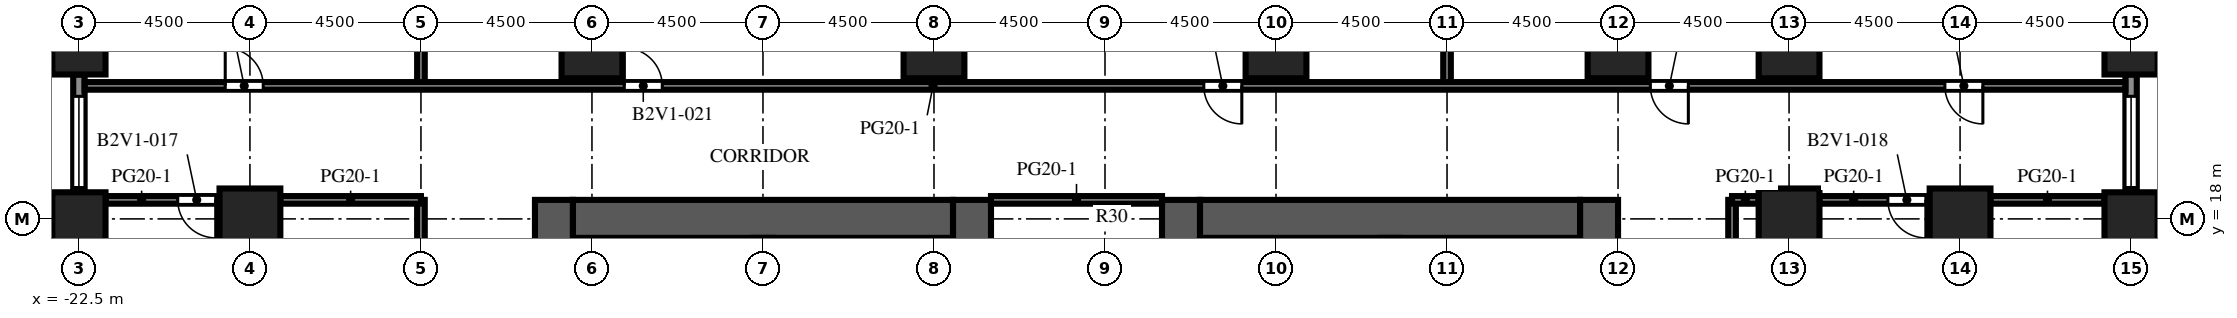
"""IFC4 building model, lengths in metres.
Left out: names, types, materials, properties, quantities, classifications, styles, units other than length and angle.
Written with IfcOpenShell. Run it as: python <this file> out.ifc"""

import sys

from ifc_helpers import new_model, si_unit, direction, frame, frame_2d, origin, origin_2d, place, context, subcontext, project, spatial, rectangle, extrude, element, fill, save


model = new_model("IFC4")
c1 = context("Model", 3, precision=1e-05, world=origin(), true_north=direction((0.0, 1.0)))
c2 = subcontext(c1, "Body", "Model", "MODEL_VIEW")
j1 = project(units=[si_unit("LENGTHUNIT", "METRE"), si_unit("PLANEANGLEUNIT", "RADIAN")], contexts=[c1])
p1 = place(None, origin())
s1 = spatial("IfcSite", under=j1, at=p1, CompositionType="ELEMENT")
p2 = place(p1, origin())
s2 = spatial("IfcBuilding", under=s1, at=p2, CompositionType="ELEMENT")
p3 = place(p2, frame((0.0, 0.0, 46.0)))
s3 = spatial("IfcBuildingStorey", under=s2, at=p3, CompositionType="ELEMENT", Elevation=46.0)
for number, where, z_axis, x_axis in (
    (1, (-22.5, 18.0, 0.0), (0.0, 0.0, 1.0), (1.0, 0.0, 0.0)),
    (2, (-22.5, 22.5, 0.0), (0.0, 0.0, 1.0), (1.0, 0.0, 0.0)),
    (3, (31.5, 18.0, 0.0), (0.0, 0.0, 1.0), (1.0, 0.0, 0.0)),
    (4, (31.5, 22.5, 0.0), (0.0, 0.0, 1.0), (1.0, 0.0, 0.0)),
):
    element("IfcColumn", number, at=place(p3, frame(where, z_axis=z_axis, x_axis=x_axis)), inside=s3, PredefinedType="COLUMN", context=c2, shape_type="SweptSolid", body=[
        extrude(rectangle(XDim=1.4, YDim=1.4, at=origin_2d()), origin(), (0.0, 0.0, 1.0), 4.1),
    ])
for number, where, z_axis, x_axis in (
    (5, (-18.0, 18.0, 0.0), (0.0, 0.0, 1.0), (1.0, 0.0, 0.0)),
    (6, (-9.0, 22.5, 0.0), (0.0, 0.0, 1.0), (1.0, 0.0, 0.0)),
    (7, (0.0, 22.5, 0.0), (0.0, 0.0, 1.0), (1.0, 0.0, 0.0)),
    (8, (9.0, 22.5, 0.0), (0.0, 0.0, 1.0), (1.0, 0.0, 0.0)),
    (9, (18.0, 22.5, 0.0), (0.0, 0.0, 1.0), (1.0, 0.0, 0.0)),
    (10, (22.5, 18.0, 0.0), (0.0, 0.0, 1.0), (1.0, 0.0, 0.0)),
    (11, (22.5, 22.5, 0.0), (0.0, 0.0, 1.0), (1.0, 0.0, 0.0)),
    (12, (27.0, 18.0, 0.0), (0.0, 0.0, 1.0), (1.0, 0.0, 0.0)),
):
    element("IfcColumn", number, at=place(p3, frame(where, z_axis=z_axis, x_axis=x_axis)), inside=s3, PredefinedType="COLUMN", context=c2, shape_type="SweptSolid", body=[
        extrude(rectangle(XDim=1.6, YDim=1.6, at=origin_2d()), origin(), (0.0, 0.0, 1.0), 4.1),
    ])
p4 = place(p3, frame((-10.0, -9.0, 0.0), z_axis=(0.0, 0.0, 1.0), x_axis=(0.0, 1.0, 0.0)))
e13 = element("IfcWall", 13, at=p4, inside=s3, PredefinedType="SHEAR", context=c2, shape_type="SweptSolid", body=[
    extrude(rectangle(XDim=27.5, YDim=1.0, at=frame_2d((13.75, 0.0))), origin(), (0.0, 0.0, 1.0), 4.1),
])
p5 = place(p4, frame((12.55, 0.0, 0.0)))
e14 = element("IfcOpeningElement", 14, at=p5, cuts=e13, PredefinedType="OPENING", context=c2, shape_type="SweptSolid", body=[
    extrude(rectangle(XDim=2.4, YDim=2.4, at=frame_2d((1.2, 1.2))), frame((0.0, 0.51, 0.0), z_axis=(0.0, -1.0, 0.0), x_axis=(1.0, 0.0, 0.0)), (0.0, 0.0, 1.0), 1.02),
])
p6 = place(p4, frame((6.825, 0.0, 0.0)))
e15 = element("IfcOpeningElement", 15, at=p6, cuts=e13, PredefinedType="OPENING", context=c2, shape_type="SweptSolid", body=[
    extrude(rectangle(XDim=1.2, YDim=2.1, at=frame_2d((0.6, 1.05))), frame((0.0, 0.51, 0.0), z_axis=(0.0, -1.0, 0.0), x_axis=(1.0, 0.0, 0.0)), (0.0, 0.0, 1.0), 1.02),
])
p7 = place(p4, frame((19.475, 0.0, 0.0)))
e16 = element("IfcOpeningElement", 16, at=p7, cuts=e13, PredefinedType="OPENING", context=c2, shape_type="SweptSolid", body=[
    extrude(rectangle(XDim=1.2, YDim=2.1, at=frame_2d((0.6, 1.05))), frame((0.0, 0.51, 0.0), z_axis=(0.0, -1.0, 0.0), x_axis=(1.0, 0.0, 0.0)), (0.0, 0.0, 1.0), 1.02),
])
p8 = place(p3, frame((1.0, -9.0, 0.0), z_axis=(0.0, 0.0, 1.0), x_axis=(0.0, 1.0, 0.0)))
e17 = element("IfcWall", 17, at=p8, inside=s3, PredefinedType="SHEAR", context=c2, shape_type="SweptSolid", body=[
    extrude(rectangle(XDim=27.5, YDim=1.0, at=frame_2d((13.75, 0.0))), origin(), (0.0, 0.0, 1.0), 4.1),
])
p9 = place(p8, frame((12.55, 0.0, 0.0)))
e18 = element("IfcOpeningElement", 18, at=p9, cuts=e17, PredefinedType="OPENING", context=c2, shape_type="SweptSolid", body=[
    extrude(rectangle(XDim=2.4, YDim=2.4, at=frame_2d((1.2, 1.2))), frame((0.0, 0.51, 0.0), z_axis=(0.0, -1.0, 0.0), x_axis=(1.0, 0.0, 0.0)), (0.0, 0.0, 1.0), 1.02),
])
p10 = place(p8, frame((4.025, 0.0, 0.0)))
e19 = element("IfcOpeningElement", 19, at=p10, cuts=e17, PredefinedType="OPENING", context=c2, shape_type="SweptSolid", body=[
    extrude(rectangle(XDim=1.2, YDim=2.1, at=frame_2d((0.6, 1.05))), frame((0.0, 0.51, 0.0), z_axis=(0.0, -1.0, 0.0), x_axis=(1.0, 0.0, 0.0)), (0.0, 0.0, 1.0), 1.02),
])
p11 = place(p8, frame((22.275, 0.0, 0.0)))
e20 = element("IfcOpeningElement", 20, at=p11, cuts=e17, PredefinedType="OPENING", context=c2, shape_type="SweptSolid", body=[
    extrude(rectangle(XDim=1.2, YDim=2.1, at=frame_2d((0.6, 1.05))), frame((0.0, 0.51, 0.0), z_axis=(0.0, -1.0, 0.0), x_axis=(1.0, 0.0, 0.0)), (0.0, 0.0, 1.0), 1.02),
])
p12 = place(p3, frame((-9.5, 18.0, 0.0), z_axis=(0.0, 0.0, 1.0), x_axis=(1.0, 0.0, 0.0)))
e21 = element("IfcWall", 21, at=p12, inside=s3, PredefinedType="SHEAR", context=c2, shape_type="SweptSolid", body=[
    extrude(rectangle(XDim=10.0, YDim=1.0, at=frame_2d((5.0, 0.0))), origin(), (0.0, 0.0, 1.0), 4.1),
])
p13 = place(p3, frame((6.5, -9.0, 0.0), z_axis=(0.0, 0.0, 1.0), x_axis=(0.0, 1.0, 0.0)))
e22 = element("IfcWall", 22, at=p13, inside=s3, PredefinedType="SHEAR", context=c2, shape_type="SweptSolid", body=[
    extrude(rectangle(XDim=27.5, YDim=1.0, at=frame_2d((13.75, 0.0))), origin(), (0.0, 0.0, 1.0), 4.1),
])
p14 = place(p13, frame((12.55, 0.0, 0.0)))
e23 = element("IfcOpeningElement", 23, at=p14, cuts=e22, PredefinedType="OPENING", context=c2, shape_type="SweptSolid", body=[
    extrude(rectangle(XDim=2.4, YDim=2.4, at=frame_2d((1.2, 1.2))), frame((0.0, 0.51, 0.0), z_axis=(0.0, -1.0, 0.0), x_axis=(1.0, 0.0, 0.0)), (0.0, 0.0, 1.0), 1.02),
])
p15 = place(p13, frame((4.025, 0.0, 0.0)))
e24 = element("IfcOpeningElement", 24, at=p15, cuts=e22, PredefinedType="OPENING", context=c2, shape_type="SweptSolid", body=[
    extrude(rectangle(XDim=1.2, YDim=2.1, at=frame_2d((0.6, 1.05))), frame((0.0, 0.51, 0.0), z_axis=(0.0, -1.0, 0.0), x_axis=(1.0, 0.0, 0.0)), (0.0, 0.0, 1.0), 1.02),
])
p16 = place(p13, frame((22.275, 0.0, 0.0)))
e25 = element("IfcOpeningElement", 25, at=p16, cuts=e22, PredefinedType="OPENING", context=c2, shape_type="SweptSolid", body=[
    extrude(rectangle(XDim=1.2, YDim=2.1, at=frame_2d((0.6, 1.05))), frame((0.0, 0.51, 0.0), z_axis=(0.0, -1.0, 0.0), x_axis=(1.0, 0.0, 0.0)), (0.0, 0.0, 1.0), 1.02),
])
p17 = place(p3, frame((17.5, -9.0, 0.0), z_axis=(0.0, 0.0, 1.0), x_axis=(0.0, 1.0, 0.0)))
e26 = element("IfcWall", 26, at=p17, inside=s3, PredefinedType="SHEAR", context=c2, shape_type="SweptSolid", body=[
    extrude(rectangle(XDim=27.5, YDim=1.0, at=frame_2d((13.75, 0.0))), origin(), (0.0, 0.0, 1.0), 4.1),
])
p18 = place(p17, frame((12.55, 0.0, 0.0)))
e27 = element("IfcOpeningElement", 27, at=p18, cuts=e26, PredefinedType="OPENING", context=c2, shape_type="SweptSolid", body=[
    extrude(rectangle(XDim=2.4, YDim=2.4, at=frame_2d((1.2, 1.2))), frame((0.0, 0.51, 0.0), z_axis=(0.0, -1.0, 0.0), x_axis=(1.0, 0.0, 0.0)), (0.0, 0.0, 1.0), 1.02),
])
p19 = place(p17, frame((6.825, 0.0, 0.0)))
e28 = element("IfcOpeningElement", 28, at=p19, cuts=e26, PredefinedType="OPENING", context=c2, shape_type="SweptSolid", body=[
    extrude(rectangle(XDim=1.2, YDim=2.1, at=frame_2d((0.6, 1.05))), frame((0.0, 0.51, 0.0), z_axis=(0.0, -1.0, 0.0), x_axis=(1.0, 0.0, 0.0)), (0.0, 0.0, 1.0), 1.02),
])
p20 = place(p17, frame((19.475, 0.0, 0.0)))
e29 = element("IfcOpeningElement", 29, at=p20, cuts=e26, PredefinedType="OPENING", context=c2, shape_type="SweptSolid", body=[
    extrude(rectangle(XDim=1.2, YDim=2.1, at=frame_2d((0.6, 1.05))), frame((0.0, 0.51, 0.0), z_axis=(0.0, -1.0, 0.0), x_axis=(1.0, 0.0, 0.0)), (0.0, 0.0, 1.0), 1.02),
])
p21 = place(p3, frame((7.0, 18.0, 0.0), z_axis=(0.0, 0.0, 1.0), x_axis=(1.0, 0.0, 0.0)))
e30 = element("IfcWall", 30, at=p21, inside=s3, PredefinedType="SHEAR", context=c2, shape_type="SweptSolid", body=[
    extrude(rectangle(XDim=10.0, YDim=1.0, at=frame_2d((5.0, 0.0))), origin(), (0.0, 0.0, 1.0), 4.1),
])
p22 = place(p3, frame((31.5, 21.8, 0.0), z_axis=(0.0, 0.0, 1.0), x_axis=(0.0, -1.0, 0.0)))
e31 = element("IfcWall", 31, at=p22, inside=s3, PredefinedType="SOLIDWALL", context=c2, shape_type="SweptSolid", body=[
    extrude(rectangle(XDim=3.1, YDim=0.3, at=frame_2d((1.55, 0.0))), origin(), (0.0, 0.0, 1.0), 2.75),
])
p23 = place(p22, frame((0.575, 0.0, 0.8)))
e32 = element("IfcOpeningElement", 32, at=p23, cuts=e31, PredefinedType="OPENING", context=c2, shape_type="SweptSolid", body=[
    extrude(rectangle(XDim=2.4, YDim=1.7, at=frame_2d((1.2, 0.85))), frame((0.0, 0.16, 0.0), z_axis=(0.0, -1.0, 0.0), x_axis=(1.0, 0.0, 0.0)), (0.0, 0.0, 1.0), 0.32),
])
p24 = place(p3, frame((-22.5, 18.7, 0.0), z_axis=(0.0, 0.0, 1.0), x_axis=(0.0, 1.0, 0.0)))
e33 = element("IfcWall", 33, at=p24, inside=s3, PredefinedType="SOLIDWALL", context=c2, shape_type="SweptSolid", body=[
    extrude(rectangle(XDim=3.1, YDim=0.3, at=frame_2d((1.55, 0.0))), origin(), (0.0, 0.0, 1.0), 2.75),
])
p25 = place(p24, frame((0.125, 0.0, 0.8)))
e34 = element("IfcOpeningElement", 34, at=p25, cuts=e33, PredefinedType="OPENING", context=c2, shape_type="SweptSolid", body=[
    extrude(rectangle(XDim=2.4, YDim=1.7, at=frame_2d((1.2, 0.85))), frame((0.0, 0.16, 0.0), z_axis=(0.0, -1.0, 0.0), x_axis=(1.0, 0.0, 0.0)), (0.0, 0.0, 1.0), 0.32),
])
p26 = place(p3, frame((-13.5, -9.0, 0.0), z_axis=(0.0, 0.0, 1.0), x_axis=(0.0, 1.0, 0.0)))
e35 = element("IfcWall", 35, at=p26, inside=s3, PredefinedType="PARTITIONING", context=c2, shape_type="SweptSolid", body=[
    extrude(rectangle(XDim=27.5, YDim=0.2, at=frame_2d((13.75, 0.0))), origin(), (0.0, 0.0, 1.0), 3.65),
])
p27 = place(p26, frame((5.1, 0.0, 0.0)))
e36 = element("IfcOpeningElement", 36, at=p27, cuts=e35, PredefinedType="OPENING", context=c2, shape_type="SweptSolid", body=[
    extrude(rectangle(XDim=1.0, YDim=2.1, at=frame_2d((0.5, 1.05))), frame((0.0, 0.11, 0.0), z_axis=(0.0, -1.0, 0.0), x_axis=(1.0, 0.0, 0.0)), (0.0, 0.0, 1.0), 0.22),
])
p28 = place(p26, frame((15.6, 0.0, 0.0)))
e37 = element("IfcOpeningElement", 37, at=p28, cuts=e35, PredefinedType="OPENING", context=c2, shape_type="SweptSolid", body=[
    extrude(rectangle(XDim=1.0, YDim=2.1, at=frame_2d((0.5, 1.05))), frame((0.0, 0.11, 0.0), z_axis=(0.0, -1.0, 0.0), x_axis=(1.0, 0.0, 0.0)), (0.0, 0.0, 1.0), 0.22),
])
for number, where, z_axis, x_axis in (
    (38, (-13.5, 21.5, 0.0), (0.0, 0.0, 1.0), (0.0, 1.0, 0.0)),
    (39, (13.5, 21.5, 0.0), (0.0, 0.0, 1.0), (0.0, 1.0, 0.0)),
):
    element("IfcWall", number, at=place(p3, frame(where, z_axis=z_axis, x_axis=x_axis)), inside=s3, PredefinedType="PARTITIONING", context=c2, shape_type="SweptSolid", body=[
        extrude(rectangle(XDim=4.8, YDim=0.2, at=frame_2d((2.4, 0.0))), origin(), (0.0, 0.0, 1.0), 3.65),
    ])
p29 = place(p3, frame((21.0, 18.5, 0.0), z_axis=(0.0, 0.0, 1.0), x_axis=(0.0, -1.0, 0.0)))
e40 = element("IfcWall", 40, at=p29, inside=s3, PredefinedType="PARTITIONING", context=c2, shape_type="SweptSolid", body=[
    extrude(rectangle(XDim=27.5, YDim=0.2, at=frame_2d((13.75, 0.0))), origin(), (0.0, 0.0, 1.0), 3.65),
])
p30 = place(p29, frame((10.9, 0.0, 0.0)))
e41 = element("IfcOpeningElement", 41, at=p30, cuts=e40, PredefinedType="OPENING", context=c2, shape_type="SweptSolid", body=[
    extrude(rectangle(XDim=1.0, YDim=2.1, at=frame_2d((0.5, 1.05))), frame((0.0, 0.11, 0.0), z_axis=(0.0, -1.0, 0.0), x_axis=(1.0, 0.0, 0.0)), (0.0, 0.0, 1.0), 0.22),
])
p31 = place(p3, frame((-18.8, 18.5, 0.0), z_axis=(0.0, 0.0, 1.0), x_axis=(-1.0, 0.0, 0.0)))
e42 = element("IfcWall", 42, at=p31, inside=s3, PredefinedType="PARTITIONING", context=c2, shape_type="SweptSolid", body=[
    extrude(rectangle(XDim=3.0, YDim=0.2, at=frame_2d((1.5, 0.0))), origin(), (0.0, 0.0, 1.0), 3.65),
])
p32 = place(p31, frame((0.1, 0.0, 0.0)))
e43 = element("IfcOpeningElement", 43, at=p32, cuts=e42, PredefinedType="OPENING", context=c2, shape_type="SweptSolid", body=[
    extrude(rectangle(XDim=1.0, YDim=2.1, at=frame_2d((0.5, 1.05))), frame((0.0, 0.11, 0.0), z_axis=(0.0, -1.0, 0.0), x_axis=(1.0, 0.0, 0.0)), (0.0, 0.0, 1.0), 0.22),
])
p33 = place(p3, frame((-17.2, 18.5, 0.0), z_axis=(0.0, 0.0, 1.0), x_axis=(1.0, 0.0, 0.0)))
e44 = element("IfcWall", 44, at=p33, inside=s3, PredefinedType="PARTITIONING", context=c2, shape_type="SweptSolid", body=[
    extrude(rectangle(XDim=3.7, YDim=0.2, at=frame_2d((1.85, 0.0))), origin(), (0.0, 0.0, 1.0), 3.65),
])
p34 = place(p3, frame((1.5, 18.5, 0.0), z_axis=(0.0, 0.0, 1.0), x_axis=(1.0, 0.0, 0.0)))
e45 = element("IfcWall", 45, at=p34, inside=s3, PredefinedType="PARTITIONING", context=c2, shape_type="SweptSolid", body=[
    extrude(rectangle(XDim=4.5, YDim=0.2, at=frame_2d((2.25, 0.0))), origin(), (0.0, 0.0, 1.0), 3.65),
])
p35 = place(p3, frame((21.0, 18.5, 0.0), z_axis=(0.0, 0.0, 1.0), x_axis=(1.0, 0.0, 0.0)))
e46 = element("IfcWall", 46, at=p35, inside=s3, PredefinedType="PARTITIONING", context=c2, shape_type="SweptSolid", body=[
    extrude(rectangle(XDim=0.7, YDim=0.2, at=frame_2d((0.35, 0.0))), origin(), (0.0, 0.0, 1.0), 3.65),
])
p36 = place(p3, frame((26.2, 18.5, 0.0), z_axis=(0.0, 0.0, 1.0), x_axis=(-1.0, 0.0, 0.0)))
e47 = element("IfcWall", 47, at=p36, inside=s3, PredefinedType="PARTITIONING", context=c2, shape_type="SweptSolid", body=[
    extrude(rectangle(XDim=2.9, YDim=0.2, at=frame_2d((1.45, 0.0))), origin(), (0.0, 0.0, 1.0), 3.65),
])
p37 = place(p36, frame((0.1, 0.0, 0.0)))
e48 = element("IfcOpeningElement", 48, at=p37, cuts=e47, PredefinedType="OPENING", context=c2, shape_type="SweptSolid", body=[
    extrude(rectangle(XDim=1.0, YDim=2.1, at=frame_2d((0.5, 1.05))), frame((0.0, 0.11, 0.0), z_axis=(0.0, -1.0, 0.0), x_axis=(1.0, 0.0, 0.0)), (0.0, 0.0, 1.0), 0.22),
])
p38 = place(p3, frame((27.8, 18.5, 0.0), z_axis=(0.0, 0.0, 1.0), x_axis=(1.0, 0.0, 0.0)))
e49 = element("IfcWall", 49, at=p38, inside=s3, PredefinedType="PARTITIONING", context=c2, shape_type="SweptSolid", body=[
    extrude(rectangle(XDim=3.0, YDim=0.2, at=frame_2d((1.5, 0.0))), origin(), (0.0, 0.0, 1.0), 3.65),
])
p39 = place(p3, frame((-22.35, 21.5, 0.0), z_axis=(0.0, 0.0, 1.0), x_axis=(1.0, 0.0, 0.0)))
e50 = element("IfcWall", 50, at=p39, inside=s3, PredefinedType="PARTITIONING", context=c2, shape_type="SweptSolid", body=[
    extrude(rectangle(XDim=53.7, YDim=0.2, at=frame_2d((26.85, 0.0))), origin(), (0.0, 0.0, 1.0), 3.65),
])
p40 = place(p39, frame((3.7, 0.0, 0.0)))
e51 = element("IfcOpeningElement", 51, at=p40, cuts=e50, PredefinedType="OPENING", context=c2, shape_type="SweptSolid", body=[
    extrude(rectangle(XDim=1.0, YDim=2.1, at=frame_2d((0.5, 1.05))), frame((0.0, 0.11, 0.0), z_axis=(0.0, -1.0, 0.0), x_axis=(1.0, 0.0, 0.0)), (0.0, 0.0, 1.0), 0.22),
])
p41 = place(p39, frame((14.2, 0.0, 0.0)))
e52 = element("IfcOpeningElement", 52, at=p41, cuts=e50, PredefinedType="OPENING", context=c2, shape_type="SweptSolid", body=[
    extrude(rectangle(XDim=1.0, YDim=2.1, at=frame_2d((0.5, 1.05))), frame((0.0, 0.11, 0.0), z_axis=(0.0, -1.0, 0.0), x_axis=(1.0, 0.0, 0.0)), (0.0, 0.0, 1.0), 0.22),
])
p42 = place(p39, frame((29.45, 0.0, 0.0)))
e53 = element("IfcOpeningElement", 53, at=p42, cuts=e50, PredefinedType="OPENING", context=c2, shape_type="SweptSolid", body=[
    extrude(rectangle(XDim=1.0, YDim=2.1, at=frame_2d((0.5, 1.05))), frame((0.0, 0.11, 0.0), z_axis=(0.0, -1.0, 0.0), x_axis=(1.0, 0.0, 0.0)), (0.0, 0.0, 1.0), 0.22),
])
p43 = place(p39, frame((41.2, 0.0, 0.0)))
e54 = element("IfcOpeningElement", 54, at=p43, cuts=e50, PredefinedType="OPENING", context=c2, shape_type="SweptSolid", body=[
    extrude(rectangle(XDim=1.0, YDim=2.1, at=frame_2d((0.5, 1.05))), frame((0.0, 0.11, 0.0), z_axis=(0.0, -1.0, 0.0), x_axis=(1.0, 0.0, 0.0)), (0.0, 0.0, 1.0), 0.22),
])
p44 = place(p39, frame((48.95, 0.0, 0.0)))
e55 = element("IfcOpeningElement", 55, at=p44, cuts=e50, PredefinedType="OPENING", context=c2, shape_type="SweptSolid", body=[
    extrude(rectangle(XDim=1.0, YDim=2.1, at=frame_2d((0.5, 1.05))), frame((0.0, 0.11, 0.0), z_axis=(0.0, -1.0, 0.0), x_axis=(1.0, 0.0, 0.0)), (0.0, 0.0, 1.0), 0.22),
])
p45 = place(p23, origin())
e56 = element("IfcWindow", 56, at=p45, inside=s3, PartitioningType="SINGLE_PANEL", PredefinedType="WINDOW", context=c2, shape_type="SweptSolid", body=[
    extrude(rectangle(XDim=2.4, YDim=1.7, at=frame_2d((1.2, 0.85))), frame((0.0, 0.03, 0.0), z_axis=(0.0, -1.0, 0.0), x_axis=(1.0, 0.0, 0.0)), (0.0, 0.0, 1.0), 0.06),
])
fill(e32, e56)
p46 = place(p25, origin())
e57 = element("IfcWindow", 57, at=p46, inside=s3, PartitioningType="SINGLE_PANEL", PredefinedType="WINDOW", context=c2, shape_type="SweptSolid", body=[
    extrude(rectangle(XDim=2.4, YDim=1.7, at=frame_2d((1.2, 0.85))), frame((0.0, 0.03, 0.0), z_axis=(0.0, -1.0, 0.0), x_axis=(1.0, 0.0, 0.0)), (0.0, 0.0, 1.0), 0.06),
])
fill(e34, e57)
p47 = place(p32, origin())
e58 = element("IfcDoor", 58, at=p47, inside=s3, OperationType="SINGLE_SWING_LEFT", PredefinedType="DOOR", context=c2, shape_type="SweptSolid", body=[
    extrude(rectangle(XDim=1.0, YDim=2.1, at=frame_2d((0.5, 1.05))), frame((0.0, 0.025, 0.0), z_axis=(0.0, -1.0, 0.0), x_axis=(1.0, 0.0, 0.0)), (0.0, 0.0, 1.0), 0.05),
])
fill(e43, e58)
p48 = place(p37, origin())
e59 = element("IfcDoor", 59, at=p48, inside=s3, OperationType="SINGLE_SWING_LEFT", PredefinedType="DOOR", context=c2, shape_type="SweptSolid", body=[
    extrude(rectangle(XDim=1.0, YDim=2.1, at=frame_2d((0.5, 1.05))), frame((0.0, 0.025, 0.0), z_axis=(0.0, -1.0, 0.0), x_axis=(1.0, 0.0, 0.0)), (0.0, 0.0, 1.0), 0.05),
])
fill(e48, e59)
p49 = place(p40, origin())
e60 = element("IfcDoor", 60, at=p49, inside=s3, OperationType="SINGLE_SWING_LEFT", PredefinedType="DOOR", context=c2, shape_type="SweptSolid", body=[
    extrude(rectangle(XDim=1.0, YDim=2.1, at=frame_2d((0.5, 1.05))), frame((0.0, 0.025, 0.0), z_axis=(0.0, -1.0, 0.0), x_axis=(1.0, 0.0, 0.0)), (0.0, 0.0, 1.0), 0.05),
])
fill(e51, e60)
p50 = place(p41, origin())
e61 = element("IfcDoor", 61, at=p50, inside=s3, OperationType="SINGLE_SWING_LEFT", PredefinedType="DOOR", context=c2, shape_type="SweptSolid", body=[
    extrude(rectangle(XDim=1.0, YDim=2.1, at=frame_2d((0.5, 1.05))), frame((0.0, 0.025, 0.0), z_axis=(0.0, -1.0, 0.0), x_axis=(1.0, 0.0, 0.0)), (0.0, 0.0, 1.0), 0.05),
])
fill(e52, e61)
p51 = place(p42, origin())
e62 = element("IfcDoor", 62, at=p51, inside=s3, OperationType="SINGLE_SWING_RIGHT", PredefinedType="DOOR", context=c2, shape_type="SweptSolid", body=[
    extrude(rectangle(XDim=1.0, YDim=2.1, at=frame_2d((0.5, 1.05))), frame((0.0, 0.025, 0.0), z_axis=(0.0, -1.0, 0.0), x_axis=(1.0, 0.0, 0.0)), (0.0, 0.0, 1.0), 0.05),
])
fill(e53, e62)
p52 = place(p43, origin())
e63 = element("IfcDoor", 63, at=p52, inside=s3, OperationType="SINGLE_SWING_RIGHT", PredefinedType="DOOR", context=c2, shape_type="SweptSolid", body=[
    extrude(rectangle(XDim=1.0, YDim=2.1, at=frame_2d((0.5, 1.05))), frame((0.0, 0.025, 0.0), z_axis=(0.0, -1.0, 0.0), x_axis=(1.0, 0.0, 0.0)), (0.0, 0.0, 1.0), 0.05),
])
fill(e54, e63)
p53 = place(p44, origin())
e64 = element("IfcDoor", 64, at=p53, inside=s3, OperationType="SINGLE_SWING_RIGHT", PredefinedType="DOOR", context=c2, shape_type="SweptSolid", body=[
    extrude(rectangle(XDim=1.0, YDim=2.1, at=frame_2d((0.5, 1.05))), frame((0.0, 0.025, 0.0), z_axis=(0.0, -1.0, 0.0), x_axis=(1.0, 0.0, 0.0)), (0.0, 0.0, 1.0), 0.05),
])
fill(e55, e64)
save(model, sys.argv[1])
